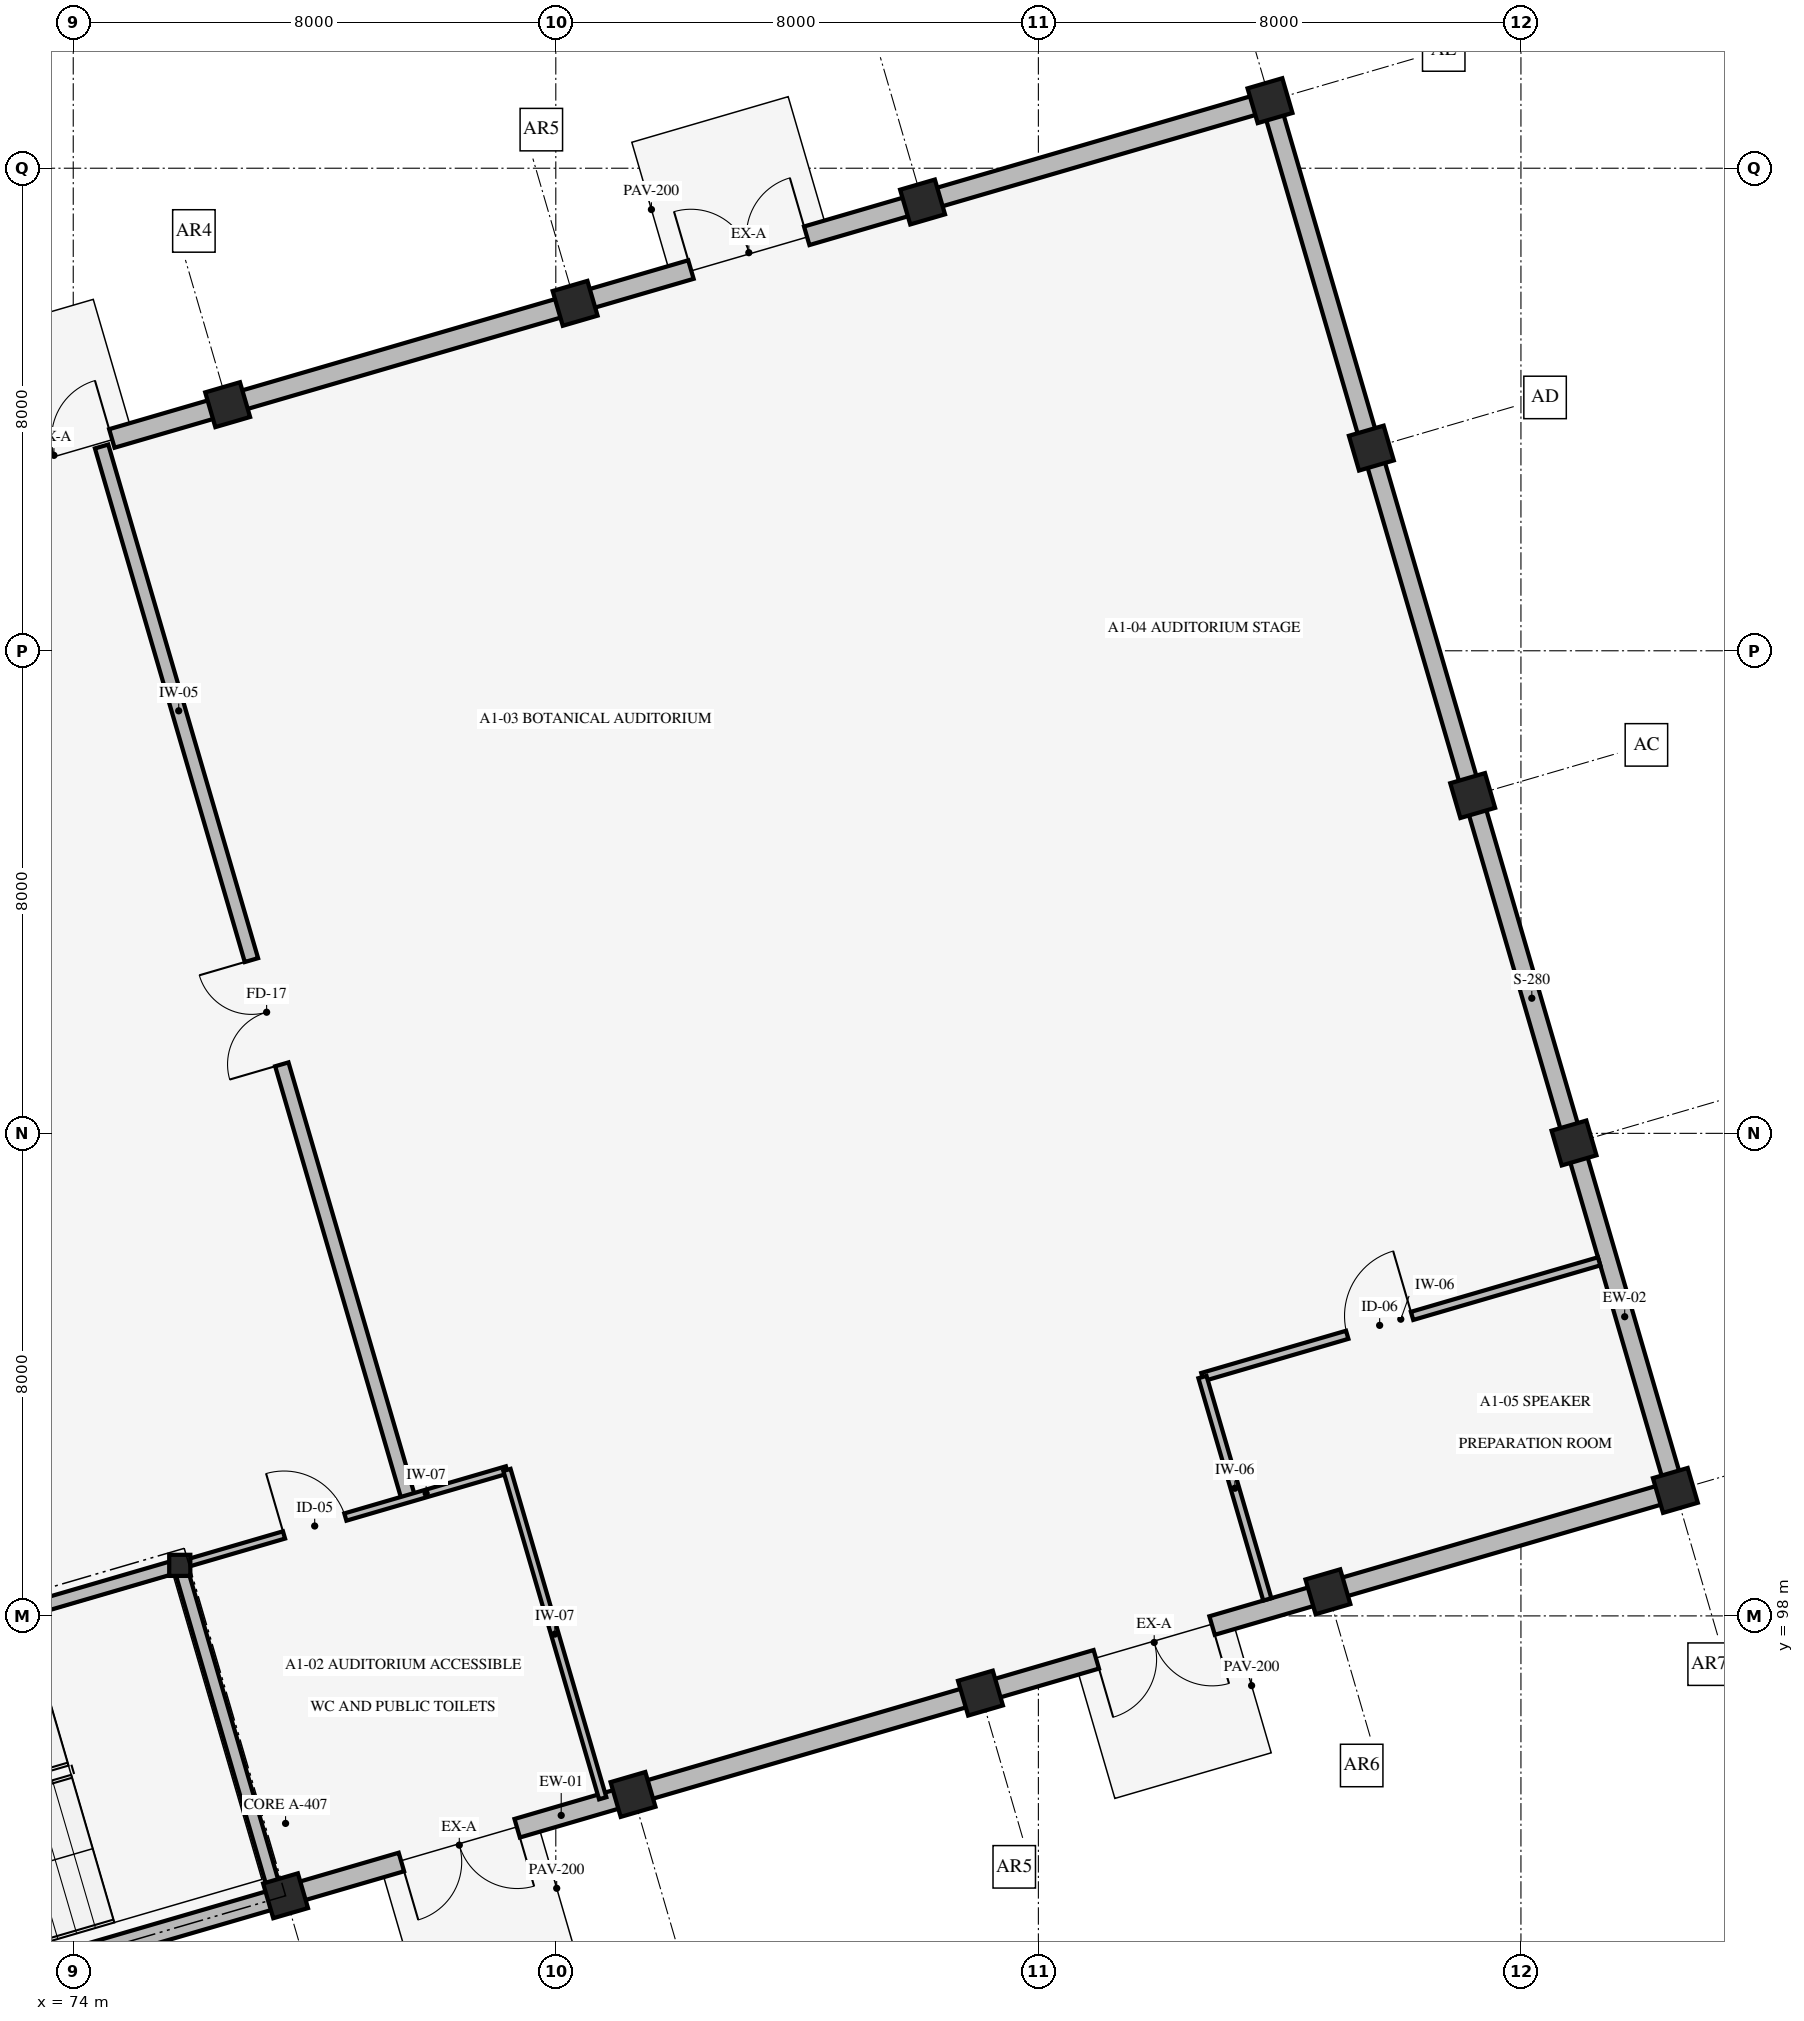
"""IFC4 building model, lengths in metres.
Left out: names, types, materials, properties, quantities, classifications, styles, units other than length and angle.
Written with IfcOpenShell. Run it as: python <this file> out.ifc"""

import sys

from ifc_helpers import new_model, si_unit, direction, frame, frame_2d, origin, origin_2d, place, context, subcontext, project, spatial, rectangle, i_section, extrude, element, fill, save


model = new_model("IFC4")
c1 = context("Model", 3, precision=1e-05, world=origin(), true_north=direction((0.0, 1.0)))
c2 = subcontext(c1, "Body", "Model", "MODEL_VIEW")
j1 = project(units=[si_unit("LENGTHUNIT", "METRE"), si_unit("PLANEANGLEUNIT", "RADIAN")], contexts=[c1])
p1 = place(None, origin())
s1 = spatial("IfcSite", under=j1, at=p1, CompositionType="ELEMENT")
p2 = place(p1, origin())
s2 = spatial("IfcBuilding", under=s1, at=p2, CompositionType="ELEMENT")
p3 = place(p2, origin())
s3 = spatial("IfcBuildingStorey", under=s2, at=p3, CompositionType="ELEMENT", Elevation=0.0)
p4 = place(p3, frame((75.766, 98.838, -0.28), z_axis=(0.0, 0.0, 1.0), x_axis=(1.0, 0.0, 0.0)))
e1 = element("IfcColumn", 1, at=p4, inside=s3, PredefinedType="COLUMN", context=c2, shape_type="SweptSolid", body=[
    extrude(i_section(OverallWidth=0.35, OverallDepth=0.35, WebThickness=0.012, FlangeThickness=0.019, FilletRadius=0.02, at=origin_2d()), origin(), (0.0, 0.0, 1.0), 5.68),
])
for number, where, z_axis, x_axis in (
    (2, (77.52, 93.36, -0.28), (0.0, 0.0, 1.0), (0.96, 0.28, 0.0)),
    (3, (83.28, 95.04, -0.28), (0.0, 0.0, 1.0), (0.96, 0.28, 0.0)),
    (4, (76.56, 118.08, -0.28), (0.0, 0.0, 1.0), (0.96, 0.28, 0.0)),
    (5, (89.04, 96.72, -0.28), (0.0, 0.0, 1.0), (0.96, 0.28, 0.0)),
    (6, (82.32, 119.76, -0.28), (0.0, 0.0, 1.0), (0.96, 0.28, 0.0)),
    (7, (94.8, 98.4, -0.28), (0.0, 0.0, 1.0), (0.96, 0.28, 0.0)),
    (8, (88.08, 121.44, -0.28), (0.0, 0.0, 1.0), (0.96, 0.28, 0.0)),
    (9, (100.56, 100.08, -0.28), (0.0, 0.0, 1.0), (0.96, 0.28, 0.0)),
    (10, (93.84, 123.12, -0.28), (0.0, 0.0, 1.0), (0.96, 0.28, 0.0)),
    (11, (98.88, 105.84, -0.28), (0.0, 0.0, 1.0), (0.96, 0.28, 0.0)),
    (12, (97.2, 111.6, -0.28), (0.0, 0.0, 1.0), (0.96, 0.28, 0.0)),
    (13, (95.52, 117.36, -0.28), (0.0, 0.0, 1.0), (0.96, 0.28, 0.0)),
):
    element("IfcColumn", number, at=place(p3, frame(where, z_axis=z_axis, x_axis=x_axis)), inside=s3, PredefinedType="COLUMN", context=c2, shape_type="SweptSolid", body=[
        extrude(rectangle(XDim=0.6, YDim=0.6, at=origin_2d()), origin(), (0.0, 0.0, 1.0), 5.68),
    ])
p5 = place(p3, frame((77.52, 93.36, 0.0), z_axis=(0.0, 0.0, 1.0), x_axis=(-0.959992252312, -0.280026562133, 0.0)))
e14 = element("IfcWall", 14, at=p5, inside=s3, PredefinedType="STANDARD", context=c2, shape_type="SweptSolid", body=[
    extrude(rectangle(XDim=6.0, YDim=0.32, at=frame_2d((3.0, 0.0))), origin(), (0.0, 0.0, 1.0), 4.45),
])
p6 = place(p3, frame((83.28, 95.04, 0.0), z_axis=(0.0, 0.0, 1.0), x_axis=(-0.960003190047, -0.279989062464, 0.0)))
e15 = element("IfcWall", 15, at=p6, inside=s3, PredefinedType="STANDARD", context=c2, shape_type="SweptSolid", body=[
    extrude(rectangle(XDim=6.0, YDim=0.32, at=frame_2d((3.0, 0.0))), origin(), (0.0, 0.0, 1.0), 4.45),
])
p7 = place(p6, frame((2.0, 0.0, 0.0)))
e16 = element("IfcOpeningElement", 16, at=p7, cuts=e15, PredefinedType="OPENING", context=c2, shape_type="SweptSolid", body=[
    extrude(rectangle(XDim=2.0, YDim=2.4, at=frame_2d((1.0, 1.2))), frame((0.0, 0.17, 0.0), z_axis=(0.0, -1.0, 0.0), x_axis=(1.0, 0.0, 0.0)), (0.0, 0.0, 1.0), 0.34),
])
p8 = place(p3, frame((89.04, 96.72, 0.0), z_axis=(0.0, 0.0, 1.0), x_axis=(-0.960003190047, -0.279989062464, 0.0)))
e17 = element("IfcWall", 17, at=p8, inside=s3, PredefinedType="STANDARD", context=c2, shape_type="SweptSolid", body=[
    extrude(rectangle(XDim=6.0, YDim=0.32, at=frame_2d((3.0, 0.0))), origin(), (0.0, 0.0, 1.0), 4.45),
])
p9 = place(p3, frame((94.8, 98.4, 0.0), z_axis=(0.0, 0.0, 1.0), x_axis=(-0.960003190047, -0.279989062464, 0.0)))
e18 = element("IfcWall", 18, at=p9, inside=s3, PredefinedType="STANDARD", context=c2, shape_type="SweptSolid", body=[
    extrude(rectangle(XDim=6.0, YDim=0.32, at=frame_2d((3.0, 0.0))), origin(), (0.0, 0.0, 1.0), 4.45),
])
p10 = place(p9, frame((2.0, 0.0, 0.0)))
e19 = element("IfcOpeningElement", 19, at=p10, cuts=e18, PredefinedType="OPENING", context=c2, shape_type="SweptSolid", body=[
    extrude(rectangle(XDim=2.0, YDim=2.4, at=frame_2d((1.0, 1.2))), frame((0.0, 0.17, 0.0), z_axis=(0.0, -1.0, 0.0), x_axis=(1.0, 0.0, 0.0)), (0.0, 0.0, 1.0), 0.34),
])
p11 = place(p3, frame((100.56, 100.08, 0.0), z_axis=(0.0, 0.0, 1.0), x_axis=(-0.959992252312, -0.280026562133, 0.0)))
e20 = element("IfcWall", 20, at=p11, inside=s3, PredefinedType="STANDARD", context=c2, shape_type="SweptSolid", body=[
    extrude(rectangle(XDim=6.0, YDim=0.32, at=frame_2d((3.0, 0.0))), origin(), (0.0, 0.0, 1.0), 4.45),
])
p12 = place(p3, frame((70.8, 116.4, 0.0), z_axis=(0.0, 0.0, 1.0), x_axis=(0.959992252312, 0.280026562133, 0.0)))
e21 = element("IfcWall", 21, at=p12, inside=s3, PredefinedType="STANDARD", context=c2, shape_type="SweptSolid", body=[
    extrude(rectangle(XDim=6.0, YDim=0.32, at=frame_2d((3.0, 0.0))), origin(), (0.0, 0.0, 1.0), 4.45),
])
p13 = place(p12, frame((2.0, 0.0, 0.0)))
e22 = element("IfcOpeningElement", 22, at=p13, cuts=e21, PredefinedType="OPENING", context=c2, shape_type="SweptSolid", body=[
    extrude(rectangle(XDim=2.0, YDim=2.4, at=frame_2d((1.0, 1.2))), frame((0.0, 0.17, 0.0), z_axis=(0.0, -1.0, 0.0), x_axis=(1.0, 0.0, 0.0)), (0.0, 0.0, 1.0), 0.34),
])
p14 = place(p3, frame((76.56, 118.08, 0.0), z_axis=(0.0, 0.0, 1.0), x_axis=(0.960003190047, 0.279989062464, 0.0)))
e23 = element("IfcWall", 23, at=p14, inside=s3, PredefinedType="STANDARD", context=c2, shape_type="SweptSolid", body=[
    extrude(rectangle(XDim=6.0, YDim=0.32, at=frame_2d((3.0, 0.0))), origin(), (0.0, 0.0, 1.0), 4.45),
])
p15 = place(p3, frame((82.32, 119.76, 0.0), z_axis=(0.0, 0.0, 1.0), x_axis=(0.960003190047, 0.279989062464, 0.0)))
e24 = element("IfcWall", 24, at=p15, inside=s3, PredefinedType="STANDARD", context=c2, shape_type="SweptSolid", body=[
    extrude(rectangle(XDim=6.0, YDim=0.32, at=frame_2d((3.0, 0.0))), origin(), (0.0, 0.0, 1.0), 4.45),
])
p16 = place(p15, frame((2.0, 0.0, 0.0)))
e25 = element("IfcOpeningElement", 25, at=p16, cuts=e24, PredefinedType="OPENING", context=c2, shape_type="SweptSolid", body=[
    extrude(rectangle(XDim=2.0, YDim=2.4, at=frame_2d((1.0, 1.2))), frame((0.0, 0.17, 0.0), z_axis=(0.0, -1.0, 0.0), x_axis=(1.0, 0.0, 0.0)), (0.0, 0.0, 1.0), 0.34),
])
p17 = place(p3, frame((88.08, 121.44, 0.0), z_axis=(0.0, 0.0, 1.0), x_axis=(0.959992252312, 0.280026562133, 0.0)))
e26 = element("IfcWall", 26, at=p17, inside=s3, PredefinedType="STANDARD", context=c2, shape_type="SweptSolid", body=[
    extrude(rectangle(XDim=6.0, YDim=0.32, at=frame_2d((3.0, 0.0))), origin(), (0.0, 0.0, 1.0), 4.45),
])
for number, where, z_axis, x_axis in (
    (27, (98.88, 105.84, 0.0), (0.0, 0.0, 1.0), (0.28, -0.96, 0.0)),
    (28, (97.2, 111.6, 0.0), (0.0, 0.0, 1.0), (0.28, -0.96, 0.0)),
    (29, (95.52, 117.36, 0.0), (0.0, 0.0, 1.0), (0.28, -0.96, 0.0)),
    (30, (93.84, 123.12, 0.0), (0.0, 0.0, 1.0), (0.28, -0.96, 0.0)),
):
    element("IfcWall", number, at=place(p3, frame(where, z_axis=z_axis, x_axis=x_axis)), inside=s3, PredefinedType="STANDARD", context=c2, shape_type="SweptSolid", body=[
        extrude(rectangle(XDim=6.0, YDim=0.3, at=frame_2d((3.0, 0.0))), origin(), (0.0, 0.0, 1.0), 4.88),
    ])
p18 = place(p3, frame((66.262, 96.066, 0.0), z_axis=(0.0, 0.0, 1.0), x_axis=(0.960001933347, 0.279993371297, 0.0)))
e31 = element("IfcWall", 31, at=p18, inside=s3, PredefinedType="STANDARD", context=c2, shape_type="SweptSolid", body=[
    extrude(rectangle(XDim=9.9, YDim=0.215, at=frame_2d((4.95, 0.0))), origin(), (0.0, 0.0, 1.0), 5.1),
])
p19 = place(p18, frame((0.55, 0.0, 0.0)))
e32 = element("IfcOpeningElement", 32, at=p19, cuts=e31, PredefinedType="OPENING", context=c2, shape_type="SweptSolid", body=[
    extrude(rectangle(XDim=1.2, YDim=2.1, at=frame_2d((0.6, 1.05))), frame((0.0, 0.118, 0.0), z_axis=(0.0, -1.0, 0.0), x_axis=(1.0, 0.0, 0.0)), (0.0, 0.0, 1.0), 0.235),
])
p20 = place(p3, frame((77.32, 93.51, 0.0), z_axis=(0.0, 0.0, 1.0), x_axis=(-0.279998310772, 0.96000049269, 0.0)))
e33 = element("IfcWall", 33, at=p20, inside=s3, PredefinedType="STANDARD", context=c2, shape_type="SweptSolid", body=[
    extrude(rectangle(XDim=5.55, YDim=0.215, at=frame_2d((2.775, 0.0))), origin(), (0.0, 0.0, 1.0), 5.1),
])
p21 = place(p3, frame((79.558, 99.944, 0.0), z_axis=(0.0, 0.0, 1.0), x_axis=(-0.280003611734, 0.95999894657, 0.0)))
e34 = element("IfcWall", 34, at=p21, inside=s3, PredefinedType="STANDARD", context=c2, shape_type="SweptSolid", body=[
    extrude(rectangle(XDim=18.17, YDim=0.23, at=frame_2d((9.085, 0.0))), origin(), (0.0, 0.0, 1.0), 5.1),
])
p22 = place(p21, frame((7.5, 0.0, 0.0)))
e35 = element("IfcOpeningElement", 35, at=p22, cuts=e34, PredefinedType="OPENING", context=c2, shape_type="SweptSolid", body=[
    extrude(rectangle(XDim=1.8, YDim=2.3, at=frame_2d((0.9, 1.15))), frame((0.0, 0.125, 0.0), z_axis=(0.0, -1.0, 0.0), x_axis=(1.0, 0.0, 0.0)), (0.0, 0.0, 1.0), 0.25),
])
p23 = place(p3, frame((75.766, 98.838, 0.0), z_axis=(0.0, 0.0, 1.0), x_axis=(0.95999612812, 0.280013274677, 0.0)))
e36 = element("IfcWall", 36, at=p23, inside=s3, PredefinedType="STANDARD", context=c2, shape_type="SweptSolid", body=[
    extrude(rectangle(XDim=5.65, YDim=0.125, at=frame_2d((2.825, 0.0))), origin(), (0.0, 0.0, 1.0), 5.1),
])
p24 = place(p23, frame((1.8, 0.0, 0.0)))
e37 = element("IfcOpeningElement", 37, at=p24, cuts=e36, PredefinedType="OPENING", context=c2, shape_type="SweptSolid", body=[
    extrude(rectangle(XDim=1.06, YDim=2.12, at=frame_2d((0.53, 1.06))), frame((0.0, 0.073, 0.0), z_axis=(0.0, -1.0, 0.0), x_axis=(1.0, 0.0, 0.0)), (0.0, 0.0, 1.0), 0.145),
])
p25 = place(p3, frame((82.778, 94.977, 0.0), z_axis=(0.0, 0.0, 1.0), x_axis=(-0.280011574193, 0.959996624118, 0.0)))
e38 = element("IfcWall", 38, at=p25, inside=s3, PredefinedType="STANDARD", context=c2, shape_type="SweptSolid", body=[
    extrude(rectangle(XDim=5.67, YDim=0.125, at=frame_2d((2.835, 0.0))), origin(), (0.0, 0.0, 1.0), 5.1),
])
p26 = place(p3, frame((92.72, 101.96, 0.0), z_axis=(0.0, 0.0, 1.0), x_axis=(0.960000399182, 0.279998631371, 0.0)))
e39 = element("IfcWall", 39, at=p26, inside=s3, PredefinedType="STANDARD", context=c2, shape_type="SweptSolid", body=[
    extrude(rectangle(XDim=6.85, YDim=0.14, at=frame_2d((3.425, 0.0))), origin(), (0.0, 0.0, 1.0), 5.1),
])
p27 = place(p26, frame((2.5, 0.0, 0.0)))
e40 = element("IfcOpeningElement", 40, at=p27, cuts=e39, PredefinedType="OPENING", context=c2, shape_type="SweptSolid", body=[
    extrude(rectangle(XDim=1.12, YDim=2.12, at=frame_2d((0.56, 1.06))), frame((0.0, 0.08, 0.0), z_axis=(0.0, -1.0, 0.0), x_axis=(1.0, 0.0, 0.0)), (0.0, 0.0, 1.0), 0.16),
])
p28 = place(p3, frame((93.795, 98.274, 0.0), z_axis=(0.0, 0.0, 1.0), x_axis=(-0.280007324434, 0.959997863676, 0.0)))
e41 = element("IfcWall", 41, at=p28, inside=s3, PredefinedType="STANDARD", context=c2, shape_type="SweptSolid", body=[
    extrude(rectangle(XDim=3.84, YDim=0.14, at=frame_2d((1.92, 0.0))), origin(), (0.0, 0.0, 1.0), 5.1),
])
p29 = place(p7, origin())
e42 = element("IfcDoor", 42, at=p29, inside=s3, OperationType="DOUBLE_DOOR_SINGLE_SWING", PredefinedType="DOOR", context=c2, shape_type="SweptSolid", body=[
    extrude(rectangle(XDim=2.0, YDim=2.4, at=frame_2d((1.0, 1.2))), frame((0.0, 0.025, 0.0), z_axis=(0.0, -1.0, 0.0), x_axis=(1.0, 0.0, 0.0)), (0.0, 0.0, 1.0), 0.05),
])
fill(e16, e42)
p30 = place(p10, origin())
e43 = element("IfcDoor", 43, at=p30, inside=s3, OperationType="DOUBLE_DOOR_SINGLE_SWING", PredefinedType="DOOR", context=c2, shape_type="SweptSolid", body=[
    extrude(rectangle(XDim=2.0, YDim=2.4, at=frame_2d((1.0, 1.2))), frame((0.0, 0.025, 0.0), z_axis=(0.0, -1.0, 0.0), x_axis=(1.0, 0.0, 0.0)), (0.0, 0.0, 1.0), 0.05),
])
fill(e19, e43)
p31 = place(p13, origin())
e44 = element("IfcDoor", 44, at=p31, inside=s3, OperationType="DOUBLE_DOOR_SINGLE_SWING", PredefinedType="DOOR", context=c2, shape_type="SweptSolid", body=[
    extrude(rectangle(XDim=2.0, YDim=2.4, at=frame_2d((1.0, 1.2))), frame((0.0, 0.025, 0.0), z_axis=(0.0, -1.0, 0.0), x_axis=(1.0, 0.0, 0.0)), (0.0, 0.0, 1.0), 0.05),
])
fill(e22, e44)
p32 = place(p16, origin())
e45 = element("IfcDoor", 45, at=p32, inside=s3, OperationType="DOUBLE_DOOR_SINGLE_SWING", PredefinedType="DOOR", context=c2, shape_type="SweptSolid", body=[
    extrude(rectangle(XDim=2.0, YDim=2.4, at=frame_2d((1.0, 1.2))), frame((0.0, 0.025, 0.0), z_axis=(0.0, -1.0, 0.0), x_axis=(1.0, 0.0, 0.0)), (0.0, 0.0, 1.0), 0.05),
])
fill(e25, e45)
p33 = place(p22, origin())
e46 = element("IfcDoor", 46, at=p33, inside=s3, OperationType="DOUBLE_DOOR_SINGLE_SWING", PredefinedType="DOOR", context=c2, shape_type="SweptSolid", body=[
    extrude(rectangle(XDim=1.8, YDim=2.3, at=frame_2d((0.9, 1.15))), frame((0.0, 0.025, 0.0), z_axis=(0.0, -1.0, 0.0), x_axis=(1.0, 0.0, 0.0)), (0.0, 0.0, 1.0), 0.05),
])
fill(e35, e46)
p34 = place(p24, origin())
e47 = element("IfcDoor", 47, at=p34, inside=s3, OperationType="SINGLE_SWING_LEFT", PredefinedType="DOOR", context=c2, shape_type="SweptSolid", body=[
    extrude(rectangle(XDim=1.06, YDim=2.12, at=frame_2d((0.53, 1.06))), frame((0.0, 0.025, 0.0), z_axis=(0.0, -1.0, 0.0), x_axis=(1.0, 0.0, 0.0)), (0.0, 0.0, 1.0), 0.05),
])
fill(e37, e47)
p35 = place(p27, origin())
e48 = element("IfcDoor", 48, at=p35, inside=s3, OperationType="SINGLE_SWING_RIGHT", PredefinedType="DOOR", context=c2, shape_type="SweptSolid", body=[
    extrude(rectangle(XDim=1.12, YDim=2.12, at=frame_2d((0.56, 1.06))), frame((0.0, 0.025, 0.0), z_axis=(0.0, -1.0, 0.0), x_axis=(1.0, 0.0, 0.0)), (0.0, 0.0, 1.0), 0.05),
])
fill(e40, e48)
save(model, sys.argv[1])
